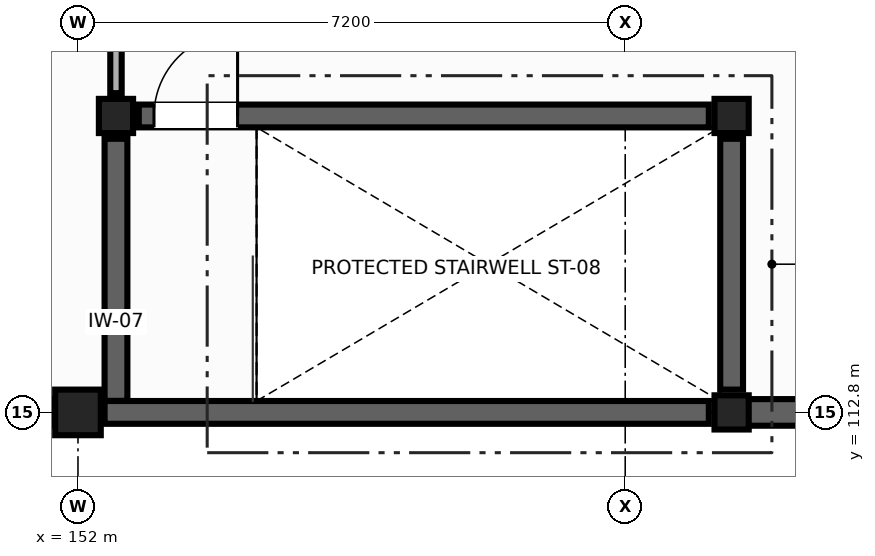
"""IFC4 building model, lengths in metres.
Left out: names, types, materials, properties, quantities, classifications, styles, units other than length and angle.
Written with IfcOpenShell. Run it as: python <this file> out.ifc"""

import sys

from ifc_helpers import new_model, si_unit, direction, frame, frame_2d, origin, origin_2d, place, context, subcontext, project, spatial, rectangle, extrude, element, fill, save


model = new_model("IFC4")
c1 = context("Model", 3, precision=1e-05, world=origin(), true_north=direction((0.0, 1.0)))
c2 = subcontext(c1, "Body", "Model", "MODEL_VIEW")
j1 = project(units=[si_unit("LENGTHUNIT", "METRE"), si_unit("PLANEANGLEUNIT", "RADIAN")], contexts=[c1])
p1 = place(None, origin())
s1 = spatial("IfcSite", under=j1, at=p1, CompositionType="ELEMENT")
p2 = place(p1, origin())
s2 = spatial("IfcBuilding", under=s1, at=p2, CompositionType="ELEMENT")
p3 = place(p2, frame((0.0, 0.0, 18.9)))
s3 = spatial("IfcBuildingStorey", under=s2, at=p3, CompositionType="ELEMENT", Elevation=18.9)
p4 = place(p3, frame((152.0, 112.8, 0.0), z_axis=(0.0, 0.0, 1.0), x_axis=(1.0, 0.0, 0.0)))
e1 = element("IfcColumn", 1, at=p4, inside=s3, PredefinedType="COLUMN", context=c2, shape_type="SweptSolid", body=[
    extrude(rectangle(XDim=0.6, YDim=0.6, at=origin_2d()), origin(), (0.0, 0.0, 1.0), 4.046),
])
p5 = place(p3, frame((160.6, 112.8, 0.0), z_axis=(0.0, 0.0, 1.0), x_axis=(1.0, 0.0, 0.0)))
e2 = element("IfcColumn", 2, at=p5, inside=s3, PredefinedType="COLUMN", context=c2, shape_type="SweptSolid", body=[
    extrude(rectangle(XDim=0.45, YDim=0.45, at=origin_2d()), origin(), (0.0, 0.0, 1.0), 4.046),
])
for number, where, z_axis, x_axis in (
    (3, (160.6, 116.7, 0.0), (0.0, 0.0, 1.0), (1.0, 0.0, 0.0)),
    (4, (152.5, 116.7, 0.0), (0.0, 0.0, 1.0), (1.0, 0.0, 0.0)),
):
    element("IfcColumn", number, at=place(p3, frame(where, z_axis=z_axis, x_axis=x_axis)), inside=s3, PredefinedType="COLUMN", context=c2, shape_type="SweptSolid", body=[
        extrude(rectangle(XDim=0.45, YDim=0.45, at=origin_2d()), origin(), (0.0, 0.0, 1.0), 4.845),
    ])
p6 = place(p3, frame((166.1, 112.8, 0.0), z_axis=(0.0, 0.0, 1.0), x_axis=(-1.0, 0.0, 0.0)))
e5 = element("IfcWall", 5, at=p6, inside=s3, PredefinedType="SOLIDWALL", context=c2, shape_type="SweptSolid", body=[
    extrude(rectangle(XDim=5.35, YDim=0.35, at=frame_2d((2.675, 0.0))), origin(), (0.0, 0.0, 1.0), 4.046),
])
p7 = place(p3, frame((151.7, 112.8, 0.0), z_axis=(0.0, 0.0, 1.0), x_axis=(-1.0, 0.0, 0.0)))
e6 = element("IfcWall", 6, at=p7, inside=s3, PredefinedType="SOLIDWALL", context=c2, shape_type="SweptSolid", body=[
    extrude(rectangle(XDim=6.6, YDim=0.35, at=frame_2d((3.3, 0.0))), origin(), (0.0, 0.0, 1.0), 4.046),
])
p8 = place(p7, frame((2.1, 0.0, 1.8)))
e7 = element("IfcOpeningElement", 7, at=p8, cuts=e6, PredefinedType="OPENING", context=c2, shape_type="SweptSolid", body=[
    extrude(rectangle(XDim=2.4, YDim=1.2, at=frame_2d((1.2, 0.6))), frame((0.0, 0.185, 0.0), z_axis=(0.0, -1.0, 0.0), x_axis=(1.0, 0.0, 0.0)), (0.0, 0.0, 1.0), 0.37),
])
p9 = place(p3, frame((160.3, 112.8, 0.0), z_axis=(0.0, 0.0, 1.0), x_axis=(-1.0, 0.0, 0.0)))
e8 = element("IfcWall", 8, at=p9, inside=s3, PredefinedType="SHEAR", context=c2, shape_type="SweptSolid", body=[
    extrude(rectangle(XDim=7.95, YDim=0.3, at=frame_2d((3.975, 0.0))), origin(), (0.0, 0.0, 1.0), 4.046),
])
p10 = place(p3, frame((152.5, 112.952, 0.0), z_axis=(0.0, 0.0, 1.0), x_axis=(0.0, 1.0, 0.0)))
e9 = element("IfcWall", 9, at=p10, inside=s3, PredefinedType="SHEAR", context=c2, shape_type="SweptSolid", body=[
    extrude(rectangle(XDim=3.448, YDim=0.3, at=frame_2d((1.724, 0.0))), origin(), (0.0, 0.0, 1.0), 4.431),
])
p11 = place(p3, frame((152.8, 116.7, 0.0), z_axis=(0.0, 0.0, 1.0), x_axis=(1.0, 0.0, 0.0)))
e10 = element("IfcWall", 10, at=p11, inside=s3, PredefinedType="SHEAR", context=c2, shape_type="SweptSolid", body=[
    extrude(rectangle(XDim=7.5, YDim=0.3, at=frame_2d((3.75, 0.0))), origin(), (0.0, 0.0, 1.0), 4.845),
])
p12 = place(p11, frame((0.2, 0.0, 0.0)))
e11 = element("IfcOpeningElement", 11, at=p12, cuts=e10, PredefinedType="OPENING", context=c2, shape_type="SweptSolid", body=[
    extrude(rectangle(XDim=1.1, YDim=2.15, at=frame_2d((0.55, 1.075))), frame((0.0, 0.16, 0.0), z_axis=(0.0, -1.0, 0.0), x_axis=(1.0, 0.0, 0.0)), (0.0, 0.0, 1.0), 0.32),
])
p13 = place(p3, frame((160.6, 116.4, 0.0), z_axis=(0.0, 0.0, 1.0), x_axis=(0.0, -1.0, 0.0)))
e12 = element("IfcWall", 12, at=p13, inside=s3, PredefinedType="SHEAR", context=c2, shape_type="SweptSolid", body=[
    extrude(rectangle(XDim=3.3, YDim=0.3, at=frame_2d((1.65, 0.0))), origin(), (0.0, 0.0, 1.0), 4.446),
])
p14 = place(p3, frame((152.5, 117.0, 0.0), z_axis=(0.0, 0.0, 1.0), x_axis=(0.0, 1.0, 0.0)))
e13 = element("IfcWall", 13, at=p14, inside=s3, PredefinedType="PARTITIONING", context=c2, shape_type="SweptSolid", body=[
    extrude(rectangle(XDim=3.4, YDim=0.15, at=frame_2d((1.7, 0.0))), origin(), (0.0, 0.0, 1.0), 5.255),
])
p15 = place(p12, origin())
e14 = element("IfcDoor", 14, at=p15, inside=s3, OperationType="SINGLE_SWING_RIGHT", PredefinedType="DOOR", context=c2, shape_type="SweptSolid", body=[
    extrude(rectangle(XDim=1.1, YDim=2.15, at=frame_2d((0.55, 1.075))), frame((0.0, 0.025, 0.0), z_axis=(0.0, -1.0, 0.0), x_axis=(1.0, 0.0, 0.0)), (0.0, 0.0, 1.0), 0.05),
])
fill(e11, e14)
save(model, sys.argv[1])
